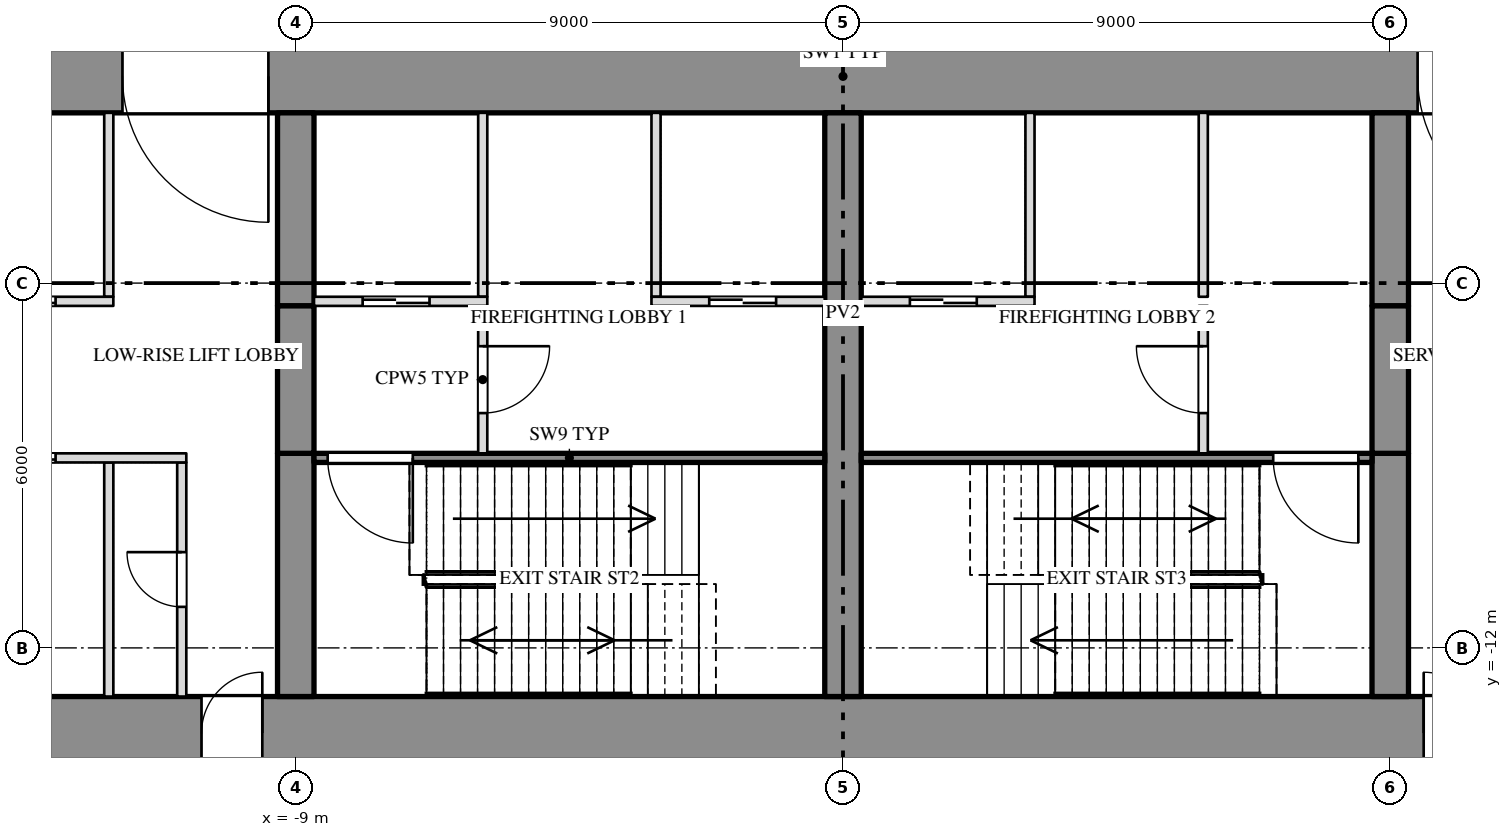
"""IFC4 building model, lengths in metres.
Left out: names, types, materials, properties, quantities, classifications, styles, units other than length and angle.
Written with IfcOpenShell. Run it as: python <this file> out.ifc"""

import sys

from ifc_helpers import new_model, si_unit, direction, frame, frame_2d, origin, place, context, subcontext, project, spatial, rectangle, extrude, element, fill, save


model = new_model("IFC4")
c1 = context("Model", 3, precision=1e-05, world=origin(), true_north=direction((0.0, 1.0)))
c2 = subcontext(c1, "Body", "Model", "MODEL_VIEW")
j1 = project(units=[si_unit("LENGTHUNIT", "METRE"), si_unit("PLANEANGLEUNIT", "RADIAN")], contexts=[c1])
p1 = place(None, origin())
s1 = spatial("IfcSite", under=j1, at=p1, CompositionType="ELEMENT")
p2 = place(p1, origin())
s2 = spatial("IfcBuilding", under=s1, at=p2, CompositionType="ELEMENT")
p3 = place(p2, frame((0.0, 0.0, 39.0)))
s3 = spatial("IfcBuildingStorey", under=s2, at=p3, CompositionType="ELEMENT", Elevation=39.0)
p4 = place(p3, frame((-27.0, -2.6, 0.0), z_axis=(0.0, 0.0, 1.0), x_axis=(1.0, 0.0, 0.0)))
e1 = element("IfcWall", 1, at=p4, inside=s3, PredefinedType="SHEAR", context=c2, shape_type="SweptSolid", body=[
    extrude(rectangle(XDim=54.0, YDim=1.2, at=frame_2d((27.0, 0.0))), origin(), (0.0, 0.0, 1.0), 4.25),
])
p5 = place(p4, frame((15.15, 0.0, 0.0)))
e2 = element("IfcOpeningElement", 2, at=p5, cuts=e1, PredefinedType="OPENING", context=c2, shape_type="SweptSolid", body=[
    extrude(rectangle(XDim=2.4, YDim=2.1, at=frame_2d((1.2, 1.05))), frame((0.0, 0.612, 0.0), z_axis=(0.0, -1.0, 0.0), x_axis=(1.0, 0.0, 0.0)), (0.0, 0.0, 1.0), 1.224),
])
p6 = place(p4, frame((36.45, 0.0, 0.0)))
e3 = element("IfcOpeningElement", 3, at=p6, cuts=e1, PredefinedType="OPENING", context=c2, shape_type="SweptSolid", body=[
    extrude(rectangle(XDim=2.4, YDim=2.1, at=frame_2d((1.2, 1.05))), frame((0.0, 0.612, 0.0), z_axis=(0.0, -1.0, 0.0), x_axis=(1.0, 0.0, 0.0)), (0.0, 0.0, 1.0), 1.224),
])
p7 = place(p3, frame((-27.0, -13.4, 0.0), z_axis=(0.0, 0.0, 1.0), x_axis=(1.0, 0.0, 0.0)))
e4 = element("IfcWall", 4, at=p7, inside=s3, PredefinedType="SHEAR", context=c2, shape_type="SweptSolid", body=[
    extrude(rectangle(XDim=54.0, YDim=1.2, at=frame_2d((27.0, 0.0))), origin(), (0.0, 0.0, 1.0), 4.25),
])
p8 = place(p7, frame((16.45, 0.0, 0.0)))
e5 = element("IfcOpeningElement", 5, at=p8, cuts=e4, PredefinedType="OPENING", context=c2, shape_type="SweptSolid", body=[
    extrude(rectangle(XDim=1.0, YDim=2.1, at=frame_2d((0.5, 1.05))), frame((0.0, 0.612, 0.0), z_axis=(0.0, -1.0, 0.0), x_axis=(1.0, 0.0, 0.0)), (0.0, 0.0, 1.0), 1.224),
])
p9 = place(p7, frame((36.55, 0.0, 0.0)))
e6 = element("IfcOpeningElement", 6, at=p9, cuts=e4, PredefinedType="OPENING", context=c2, shape_type="SweptSolid", body=[
    extrude(rectangle(XDim=1.0, YDim=2.1, at=frame_2d((0.5, 1.05))), frame((0.0, 0.612, 0.0), z_axis=(0.0, -1.0, 0.0), x_axis=(1.0, 0.0, 0.0)), (0.0, 0.0, 1.0), 1.224),
])
p10 = place(p3, frame((-9.0, -12.8, 0.0), z_axis=(0.0, 0.0, 1.0), x_axis=(0.0, 1.0, 0.0)))
e7 = element("IfcWall", 7, at=p10, inside=s3, PredefinedType="SHEAR", context=c2, shape_type="SweptSolid", body=[
    extrude(rectangle(XDim=4.0, YDim=0.6, at=frame_2d((2.0, 0.0))), origin(), (0.0, 0.0, 1.0), 4.25),
])
p11 = place(p3, frame((-9.0, -6.375, 0.0), z_axis=(0.0, 0.0, 1.0), x_axis=(0.0, 1.0, 0.0)))
e8 = element("IfcWall", 8, at=p11, inside=s3, PredefinedType="SHEAR", context=c2, shape_type="SweptSolid", body=[
    extrude(rectangle(XDim=3.175, YDim=0.6, at=frame_2d((1.587, 0.0))), origin(), (0.0, 0.0, 1.0), 4.25),
])
p12 = place(p3, frame((-9.0, -8.8, 3.6), z_axis=(0.0, 0.0, 1.0), x_axis=(0.0, 1.0, 0.0)))
e9 = element("IfcWall", 9, at=p12, inside=s3, PredefinedType="SHEAR", context=c2, shape_type="SweptSolid", body=[
    extrude(rectangle(XDim=2.425, YDim=0.6, at=frame_2d((1.212, 0.0))), origin(), (0.0, 0.0, 1.0), 0.65),
])
p13 = place(p3, frame((0.0, -12.8, 0.0), z_axis=(0.0, 0.0, 1.0), x_axis=(0.0, 1.0, 0.0)))
e10 = element("IfcWall", 10, at=p13, inside=s3, PredefinedType="SHEAR", context=c2, shape_type="SweptSolid", body=[
    extrude(rectangle(XDim=9.6, YDim=0.6, at=frame_2d((4.8, 0.0))), origin(), (0.0, 0.0, 1.0), 4.25),
])
p14 = place(p3, frame((9.0, -12.8, 0.0), z_axis=(0.0, 0.0, 1.0), x_axis=(0.0, 1.0, 0.0)))
e11 = element("IfcWall", 11, at=p14, inside=s3, PredefinedType="SHEAR", context=c2, shape_type="SweptSolid", body=[
    extrude(rectangle(XDim=4.0, YDim=0.6, at=frame_2d((2.0, 0.0))), origin(), (0.0, 0.0, 1.0), 4.25),
])
p15 = place(p3, frame((9.0, -6.375, 0.0), z_axis=(0.0, 0.0, 1.0), x_axis=(0.0, 1.0, 0.0)))
e12 = element("IfcWall", 12, at=p15, inside=s3, PredefinedType="SHEAR", context=c2, shape_type="SweptSolid", body=[
    extrude(rectangle(XDim=3.175, YDim=0.6, at=frame_2d((1.587, 0.0))), origin(), (0.0, 0.0, 1.0), 4.25),
])
p16 = place(p3, frame((9.0, -8.8, 3.6), z_axis=(0.0, 0.0, 1.0), x_axis=(0.0, 1.0, 0.0)))
e13 = element("IfcWall", 13, at=p16, inside=s3, PredefinedType="SHEAR", context=c2, shape_type="SweptSolid", body=[
    extrude(rectangle(XDim=2.425, YDim=0.6, at=frame_2d((1.212, 0.0))), origin(), (0.0, 0.0, 1.0), 0.65),
])
for number, where, z_axis, x_axis in (
    (14, (-12.075, -6.225, 0.0), (0.0, 0.0, 1.0), (0.0, 1.0, 0.0)),
    (15, (-3.075, -6.225, 0.0), (0.0, 0.0, 1.0), (0.0, 1.0, 0.0)),
    (16, (-5.925, -6.225, 0.0), (0.0, 0.0, 1.0), (0.0, 1.0, 0.0)),
    (17, (3.075, -6.225, 0.0), (0.0, 0.0, 1.0), (0.0, 1.0, 0.0)),
    (18, (5.925, -6.225, 0.0), (0.0, 0.0, 1.0), (0.0, 1.0, 0.0)),
):
    element("IfcWall", number, at=place(p3, frame(where, z_axis=z_axis, x_axis=x_axis)), inside=s3, PredefinedType="PARTITIONING", context=c2, shape_type="SweptSolid", body=[
        extrude(rectangle(XDim=3.025, YDim=0.15, at=frame_2d((1.513, 0.0))), origin(), (0.0, 0.0, 1.0), 4.25),
    ])
p17 = place(p3, frame((-10.875, -12.8, 0.0), z_axis=(0.0, 0.0, 1.0), x_axis=(0.0, 1.0, 0.0)))
e19 = element("IfcWall", 19, at=p17, inside=s3, PredefinedType="PARTITIONING", context=c2, shape_type="SweptSolid", body=[
    extrude(rectangle(XDim=3.85, YDim=0.15, at=frame_2d((1.925, 0.0))), origin(), (0.0, 0.0, 1.0), 4.25),
])
p18 = place(p17, frame((1.475, 0.0, 0.0)))
e20 = element("IfcOpeningElement", 20, at=p18, cuts=e19, PredefinedType="OPENING", context=c2, shape_type="SweptSolid", body=[
    extrude(rectangle(XDim=0.9, YDim=2.1, at=frame_2d((0.45, 1.05))), frame((0.0, 0.087, 0.0), z_axis=(0.0, -1.0, 0.0), x_axis=(1.0, 0.0, 0.0)), (0.0, 0.0, 1.0), 0.174),
])
p19 = place(p3, frame((-12.075, -12.8, 0.0), z_axis=(0.0, 0.0, 1.0), x_axis=(0.0, 1.0, 0.0)))
e21 = element("IfcWall", 21, at=p19, inside=s3, PredefinedType="PARTITIONING", context=c2, shape_type="SweptSolid", body=[
    extrude(rectangle(XDim=3.85, YDim=0.15, at=frame_2d((1.925, 0.0))), origin(), (0.0, 0.0, 1.0), 4.25),
])
p20 = place(p3, frame((-5.925, -8.8, 0.0), z_axis=(0.0, 0.0, 1.0), x_axis=(0.0, 1.0, 0.0)))
e22 = element("IfcWall", 22, at=p20, inside=s3, PredefinedType="PARTITIONING", context=c2, shape_type="SweptSolid", body=[
    extrude(rectangle(XDim=2.425, YDim=0.15, at=frame_2d((1.212, 0.0))), origin(), (0.0, 0.0, 1.0), 4.25),
])
p21 = place(p20, frame((0.662, 0.0, 0.0)))
e23 = element("IfcOpeningElement", 23, at=p21, cuts=e22, PredefinedType="OPENING", context=c2, shape_type="SweptSolid", body=[
    extrude(rectangle(XDim=1.1, YDim=2.1, at=frame_2d((0.55, 1.05))), frame((0.0, 0.087, 0.0), z_axis=(0.0, -1.0, 0.0), x_axis=(1.0, 0.0, 0.0)), (0.0, 0.0, 1.0), 0.174),
])
p22 = place(p3, frame((5.925, -8.8, 0.0), z_axis=(0.0, 0.0, 1.0), x_axis=(0.0, 1.0, 0.0)))
e24 = element("IfcWall", 24, at=p22, inside=s3, PredefinedType="PARTITIONING", context=c2, shape_type="SweptSolid", body=[
    extrude(rectangle(XDim=2.425, YDim=0.15, at=frame_2d((1.212, 0.0))), origin(), (0.0, 0.0, 1.0), 4.25),
])
p23 = place(p22, frame((0.662, 0.0, 0.0)))
e25 = element("IfcOpeningElement", 25, at=p23, cuts=e24, PredefinedType="OPENING", context=c2, shape_type="SweptSolid", body=[
    extrude(rectangle(XDim=1.1, YDim=2.1, at=frame_2d((0.55, 1.05))), frame((0.0, 0.087, 0.0), z_axis=(0.0, -1.0, 0.0), x_axis=(1.0, 0.0, 0.0)), (0.0, 0.0, 1.0), 0.174),
])
p24 = place(p3, frame((-17.7, -6.3, 0.0), z_axis=(0.0, 0.0, 1.0), x_axis=(1.0, 0.0, 0.0)))
e26 = element("IfcWall", 26, at=p24, inside=s3, PredefinedType="PARTITIONING", context=c2, shape_type="SweptSolid", body=[
    extrude(rectangle(XDim=5.7, YDim=0.15, at=frame_2d((2.85, 0.0))), origin(), (0.0, 0.0, 1.0), 4.25),
])
p25 = place(p24, frame((0.8, 0.0, 0.0)))
e27 = element("IfcOpeningElement", 27, at=p25, cuts=e26, PredefinedType="OPENING", context=c2, shape_type="SweptSolid", body=[
    extrude(rectangle(XDim=1.1, YDim=2.1, at=frame_2d((0.55, 1.05))), frame((0.0, 0.087, 0.0), z_axis=(0.0, -1.0, 0.0), x_axis=(1.0, 0.0, 0.0)), (0.0, 0.0, 1.0), 0.174),
])
p26 = place(p24, frame((3.65, 0.0, 0.0)))
e28 = element("IfcOpeningElement", 28, at=p26, cuts=e26, PredefinedType="OPENING", context=c2, shape_type="SweptSolid", body=[
    extrude(rectangle(XDim=1.1, YDim=2.1, at=frame_2d((0.55, 1.05))), frame((0.0, 0.087, 0.0), z_axis=(0.0, -1.0, 0.0), x_axis=(1.0, 0.0, 0.0)), (0.0, 0.0, 1.0), 0.174),
])
p27 = place(p3, frame((-8.7, -6.3, 0.0), z_axis=(0.0, 0.0, 1.0), x_axis=(1.0, 0.0, 0.0)))
e29 = element("IfcWall", 29, at=p27, inside=s3, PredefinedType="PARTITIONING", context=c2, shape_type="SweptSolid", body=[
    extrude(rectangle(XDim=2.85, YDim=0.15, at=frame_2d((1.425, 0.0))), origin(), (0.0, 0.0, 1.0), 4.25),
])
p28 = place(p27, frame((0.8, 0.0, 0.0)))
e30 = element("IfcOpeningElement", 30, at=p28, cuts=e29, PredefinedType="OPENING", context=c2, shape_type="SweptSolid", body=[
    extrude(rectangle(XDim=1.1, YDim=2.1, at=frame_2d((0.55, 1.05))), frame((0.0, 0.087, 0.0), z_axis=(0.0, -1.0, 0.0), x_axis=(1.0, 0.0, 0.0)), (0.0, 0.0, 1.0), 0.174),
])
p29 = place(p3, frame((-3.15, -6.3, 0.0), z_axis=(0.0, 0.0, 1.0), x_axis=(1.0, 0.0, 0.0)))
e31 = element("IfcWall", 31, at=p29, inside=s3, PredefinedType="PARTITIONING", context=c2, shape_type="SweptSolid", body=[
    extrude(rectangle(XDim=2.85, YDim=0.15, at=frame_2d((1.425, 0.0))), origin(), (0.0, 0.0, 1.0), 4.25),
])
p30 = place(p29, frame((0.95, 0.0, 0.0)))
e32 = element("IfcOpeningElement", 32, at=p30, cuts=e31, PredefinedType="OPENING", context=c2, shape_type="SweptSolid", body=[
    extrude(rectangle(XDim=1.1, YDim=2.1, at=frame_2d((0.55, 1.05))), frame((0.0, 0.087, 0.0), z_axis=(0.0, -1.0, 0.0), x_axis=(1.0, 0.0, 0.0)), (0.0, 0.0, 1.0), 0.174),
])
p31 = place(p3, frame((0.3, -6.3, 0.0), z_axis=(0.0, 0.0, 1.0), x_axis=(1.0, 0.0, 0.0)))
e33 = element("IfcWall", 33, at=p31, inside=s3, PredefinedType="PARTITIONING", context=c2, shape_type="SweptSolid", body=[
    extrude(rectangle(XDim=2.85, YDim=0.15, at=frame_2d((1.425, 0.0))), origin(), (0.0, 0.0, 1.0), 4.25),
])
p32 = place(p31, frame((0.8, 0.0, 0.0)))
e34 = element("IfcOpeningElement", 34, at=p32, cuts=e33, PredefinedType="OPENING", context=c2, shape_type="SweptSolid", body=[
    extrude(rectangle(XDim=1.1, YDim=2.1, at=frame_2d((0.55, 1.05))), frame((0.0, 0.087, 0.0), z_axis=(0.0, -1.0, 0.0), x_axis=(1.0, 0.0, 0.0)), (0.0, 0.0, 1.0), 0.174),
])
p33 = place(p3, frame((-17.7, -8.875, 0.0), z_axis=(0.0, 0.0, 1.0), x_axis=(1.0, 0.0, 0.0)))
e35 = element("IfcWall", 35, at=p33, inside=s3, PredefinedType="PARTITIONING", context=c2, shape_type="SweptSolid", body=[
    extrude(rectangle(XDim=6.9, YDim=0.15, at=frame_2d((3.45, 0.0))), origin(), (0.0, 0.0, 1.0), 4.25),
])
p34 = place(p33, frame((0.8, 0.0, 0.0)))
e36 = element("IfcOpeningElement", 36, at=p34, cuts=e35, PredefinedType="OPENING", context=c2, shape_type="SweptSolid", body=[
    extrude(rectangle(XDim=1.1, YDim=2.1, at=frame_2d((0.55, 1.05))), frame((0.0, 0.087, 0.0), z_axis=(0.0, -1.0, 0.0), x_axis=(1.0, 0.0, 0.0)), (0.0, 0.0, 1.0), 0.174),
])
p35 = place(p33, frame((3.65, 0.0, 0.0)))
e37 = element("IfcOpeningElement", 37, at=p35, cuts=e35, PredefinedType="OPENING", context=c2, shape_type="SweptSolid", body=[
    extrude(rectangle(XDim=1.1, YDim=2.1, at=frame_2d((0.55, 1.05))), frame((0.0, 0.087, 0.0), z_axis=(0.0, -1.0, 0.0), x_axis=(1.0, 0.0, 0.0)), (0.0, 0.0, 1.0), 0.174),
])
p36 = place(p3, frame((-8.7, -8.875, 0.0), z_axis=(0.0, 0.0, 1.0), x_axis=(1.0, 0.0, 0.0)))
e38 = element("IfcWall", 38, at=p36, inside=s3, PredefinedType="SHEAR", context=c2, shape_type="SweptSolid", body=[
    extrude(rectangle(XDim=8.4, YDim=0.15, at=frame_2d((4.2, 0.0))), origin(), (0.0, 0.0, 1.0), 4.25),
])
p37 = place(p36, frame((0.225, 0.0, 0.0)))
e39 = element("IfcOpeningElement", 39, at=p37, cuts=e38, PredefinedType="OPENING", context=c2, shape_type="SweptSolid", body=[
    extrude(rectangle(XDim=1.4, YDim=2.1, at=frame_2d((0.7, 1.05))), frame((0.0, 0.087, 0.0), z_axis=(0.0, -1.0, 0.0), x_axis=(1.0, 0.0, 0.0)), (0.0, 0.0, 1.0), 0.174),
])
p38 = place(p3, frame((0.3, -8.875, 0.0), z_axis=(0.0, 0.0, 1.0), x_axis=(1.0, 0.0, 0.0)))
e40 = element("IfcWall", 40, at=p38, inside=s3, PredefinedType="SHEAR", context=c2, shape_type="SweptSolid", body=[
    extrude(rectangle(XDim=8.4, YDim=0.15, at=frame_2d((4.2, 0.0))), origin(), (0.0, 0.0, 1.0), 4.25),
])
p39 = place(p38, frame((6.775, 0.0, 0.0)))
e41 = element("IfcOpeningElement", 41, at=p39, cuts=e40, PredefinedType="OPENING", context=c2, shape_type="SweptSolid", body=[
    extrude(rectangle(XDim=1.4, YDim=2.1, at=frame_2d((0.7, 1.05))), frame((0.0, 0.087, 0.0), z_axis=(0.0, -1.0, 0.0), x_axis=(1.0, 0.0, 0.0)), (0.0, 0.0, 1.0), 0.174),
])
p40 = place(p35, origin())
e42 = element("IfcDoor", 42, at=p40, inside=s3, OperationType="SLIDING_TO_RIGHT", PredefinedType="DOOR", context=c2, shape_type="SweptSolid", body=[
    extrude(rectangle(XDim=1.1, YDim=2.1, at=frame_2d((0.55, 1.05))), frame((0.0, 0.025, 0.0), z_axis=(0.0, -1.0, 0.0), x_axis=(1.0, 0.0, 0.0)), (0.0, 0.0, 1.0), 0.05),
])
fill(e37, e42)
p41 = place(p26, origin())
e43 = element("IfcDoor", 43, at=p41, inside=s3, OperationType="SLIDING_TO_LEFT", PredefinedType="DOOR", context=c2, shape_type="SweptSolid", body=[
    extrude(rectangle(XDim=1.1, YDim=2.1, at=frame_2d((0.55, 1.05))), frame((0.0, 0.025, 0.0), z_axis=(0.0, -1.0, 0.0), x_axis=(1.0, 0.0, 0.0)), (0.0, 0.0, 1.0), 0.05),
])
fill(e28, e43)
p42 = place(p18, origin())
e44 = element("IfcDoor", 44, at=p42, inside=s3, OperationType="SINGLE_SWING_RIGHT", PredefinedType="DOOR", context=c2, shape_type="SweptSolid", body=[
    extrude(rectangle(XDim=0.9, YDim=2.1, at=frame_2d((0.45, 1.05))), frame((0.0, 0.025, 0.0), z_axis=(0.0, -1.0, 0.0), x_axis=(1.0, 0.0, 0.0)), (0.0, 0.0, 1.0), 0.05),
])
fill(e20, e44)
p43 = place(p5, origin())
e45 = element("IfcDoor", 45, at=p43, inside=s3, OperationType="DOUBLE_DOOR_SINGLE_SWING", PredefinedType="DOOR", context=c2, shape_type="SweptSolid", body=[
    extrude(rectangle(XDim=2.4, YDim=2.1, at=frame_2d((1.2, 1.05))), frame((0.0, 0.025, 0.0), z_axis=(0.0, -1.0, 0.0), x_axis=(1.0, 0.0, 0.0)), (0.0, 0.0, 1.0), 0.05),
])
fill(e2, e45)
p44 = place(p8, origin())
e46 = element("IfcDoor", 46, at=p44, inside=s3, OperationType="SINGLE_SWING_RIGHT", PredefinedType="DOOR", context=c2, shape_type="SweptSolid", body=[
    extrude(rectangle(XDim=1.0, YDim=2.1, at=frame_2d((0.5, 1.05))), frame((0.0, 0.025, 0.0), z_axis=(0.0, -1.0, 0.0), x_axis=(1.0, 0.0, 0.0)), (0.0, 0.0, 1.0), 0.05),
])
fill(e5, e46)
p45 = place(p37, origin())
e47 = element("IfcDoor", 47, at=p45, inside=s3, OperationType="DOUBLE_DOOR_SINGLE_SWING", PredefinedType="DOOR", context=c2, shape_type="SweptSolid", body=[
    extrude(rectangle(XDim=1.4, YDim=2.1, at=frame_2d((0.7, 1.05))), frame((0.0, 0.025, 0.0), z_axis=(0.0, -1.0, 0.0), x_axis=(1.0, 0.0, 0.0)), (0.0, 0.0, 1.0), 0.05),
])
fill(e39, e47)
p46 = place(p28, origin())
e48 = element("IfcDoor", 48, at=p46, inside=s3, OperationType="SLIDING_TO_RIGHT", PredefinedType="DOOR", context=c2, shape_type="SweptSolid", body=[
    extrude(rectangle(XDim=1.1, YDim=2.1, at=frame_2d((0.55, 1.05))), frame((0.0, 0.025, 0.0), z_axis=(0.0, -1.0, 0.0), x_axis=(1.0, 0.0, 0.0)), (0.0, 0.0, 1.0), 0.05),
])
fill(e30, e48)
p47 = place(p21, origin())
e49 = element("IfcDoor", 49, at=p47, inside=s3, OperationType="SINGLE_SWING_LEFT", PredefinedType="DOOR", context=c2, shape_type="SweptSolid", body=[
    extrude(rectangle(XDim=1.1, YDim=2.1, at=frame_2d((0.55, 1.05))), frame((0.0, 0.025, 0.0), z_axis=(0.0, -1.0, 0.0), x_axis=(1.0, 0.0, 0.0)), (0.0, 0.0, 1.0), 0.05),
])
fill(e23, e49)
p48 = place(p30, origin())
e50 = element("IfcDoor", 50, at=p48, inside=s3, OperationType="SLIDING_TO_RIGHT", PredefinedType="DOOR", context=c2, shape_type="SweptSolid", body=[
    extrude(rectangle(XDim=1.1, YDim=2.1, at=frame_2d((0.55, 1.05))), frame((0.0, 0.025, 0.0), z_axis=(0.0, -1.0, 0.0), x_axis=(1.0, 0.0, 0.0)), (0.0, 0.0, 1.0), 0.05),
])
fill(e32, e50)
p49 = place(p32, origin())
e51 = element("IfcDoor", 51, at=p49, inside=s3, OperationType="SLIDING_TO_LEFT", PredefinedType="DOOR", context=c2, shape_type="SweptSolid", body=[
    extrude(rectangle(XDim=1.1, YDim=2.1, at=frame_2d((0.55, 1.05))), frame((0.0, 0.025, 0.0), z_axis=(0.0, -1.0, 0.0), x_axis=(1.0, 0.0, 0.0)), (0.0, 0.0, 1.0), 0.05),
])
fill(e34, e51)
p50 = place(p23, origin())
e52 = element("IfcDoor", 52, at=p50, inside=s3, OperationType="SINGLE_SWING_RIGHT", PredefinedType="DOOR", context=c2, shape_type="SweptSolid", body=[
    extrude(rectangle(XDim=1.1, YDim=2.1, at=frame_2d((0.55, 1.05))), frame((0.0, 0.025, 0.0), z_axis=(0.0, -1.0, 0.0), x_axis=(1.0, 0.0, 0.0)), (0.0, 0.0, 1.0), 0.05),
])
fill(e25, e52)
p51 = place(p39, origin())
e53 = element("IfcDoor", 53, at=p51, inside=s3, OperationType="DOUBLE_DOOR_SINGLE_SWING", PredefinedType="DOOR", context=c2, shape_type="SweptSolid", body=[
    extrude(rectangle(XDim=1.4, YDim=2.1, at=frame_2d((0.7, 1.05))), frame((0.0, 0.025, 0.0), z_axis=(0.0, -1.0, 0.0), x_axis=(1.0, 0.0, 0.0)), (0.0, 0.0, 1.0), 0.05),
])
fill(e41, e53)
p52 = place(p9, origin())
e54 = element("IfcDoor", 54, at=p52, inside=s3, OperationType="SINGLE_SWING_LEFT", PredefinedType="DOOR", context=c2, shape_type="SweptSolid", body=[
    extrude(rectangle(XDim=1.0, YDim=2.1, at=frame_2d((0.5, 1.05))), frame((0.0, 0.025, 0.0), z_axis=(0.0, -1.0, 0.0), x_axis=(1.0, 0.0, 0.0)), (0.0, 0.0, 1.0), 0.05),
])
fill(e6, e54)
p53 = place(p6, origin())
e55 = element("IfcDoor", 55, at=p53, inside=s3, OperationType="DOUBLE_DOOR_SINGLE_SWING", PredefinedType="DOOR", context=c2, shape_type="SweptSolid", body=[
    extrude(rectangle(XDim=2.4, YDim=2.1, at=frame_2d((1.2, 1.05))), frame((0.0, 0.025, 0.0), z_axis=(0.0, -1.0, 0.0), x_axis=(1.0, 0.0, 0.0)), (0.0, 0.0, 1.0), 0.05),
])
fill(e3, e55)
save(model, sys.argv[1])
